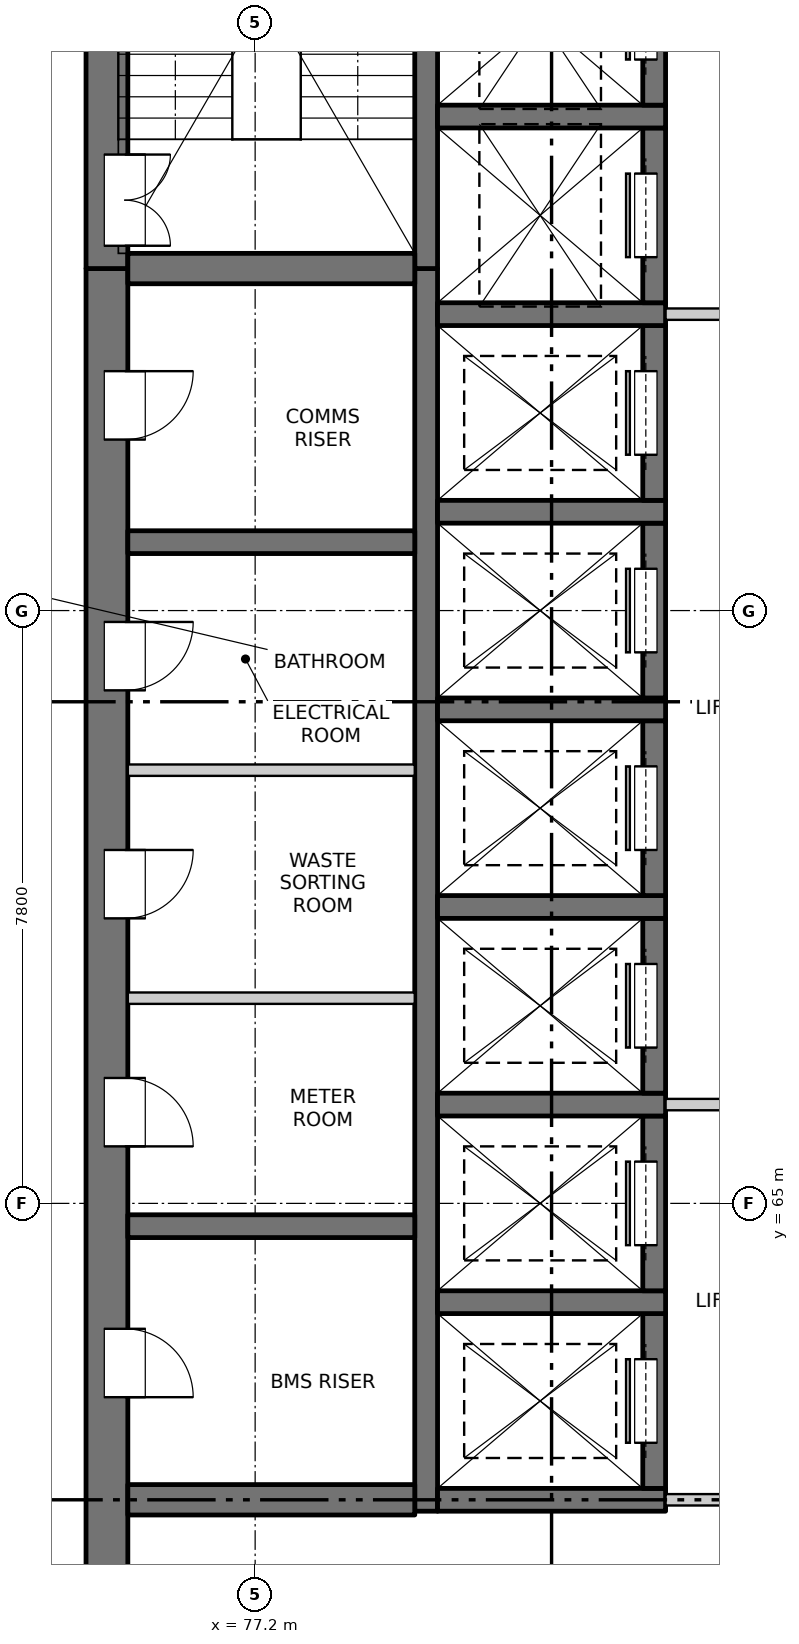
"""IFC4 building model, lengths in metres.
Left out: names, types, materials, properties, quantities, classifications, styles, units other than length and angle.
Written with IfcOpenShell. Run it as: python <this file> out.ifc"""

import sys

from ifc_helpers import new_model, si_unit, direction, frame, frame_2d, origin, place, context, subcontext, project, spatial, rectangle, extrude, element, fill, save


model = new_model("IFC4")
c1 = context("Model", 3, precision=1e-05, world=origin(), true_north=direction((0.0, 1.0)))
c2 = subcontext(c1, "Body", "Model", "MODEL_VIEW")
j1 = project(units=[si_unit("LENGTHUNIT", "METRE"), si_unit("PLANEANGLEUNIT", "RADIAN")], contexts=[c1])
p1 = place(None, origin())
s1 = spatial("IfcSite", under=j1, at=p1, CompositionType="ELEMENT")
p2 = place(p1, origin())
s2 = spatial("IfcBuilding", under=s1, at=p2, CompositionType="ELEMENT")
p3 = place(p2, frame((0.0, 0.0, 123.7)))
s3 = spatial("IfcBuildingStorey", under=s2, at=p3, CompositionType="ELEMENT", Elevation=123.7)
p4 = place(p3, frame((75.25, 54.975, -0.3), z_axis=(0.0, 0.0, 1.0), x_axis=(0.0, 1.0, 0.0)))
e1 = element("IfcWall", 1, at=p4, inside=s3, PredefinedType="SOLIDWALL", context=c2, shape_type="SweptSolid", body=[
    extrude(rectangle(XDim=22.325, YDim=0.55, at=frame_2d((11.163, 0.0))), origin(), (0.0, 0.0, 1.0), 3.45),
])
p5 = place(p4, frame((7.475, 0.0, 0.3)))
e2 = element("IfcOpeningElement", 2, at=p5, cuts=e1, PredefinedType="OPENING", context=c2, shape_type="SweptSolid", body=[
    extrude(rectangle(XDim=0.9, YDim=2.1, at=frame_2d((0.45, 1.05))), frame((0.0, 0.285, 0.0), z_axis=(0.0, -1.0, 0.0), x_axis=(1.0, 0.0, 0.0)), (0.0, 0.0, 1.0), 0.57),
])
p6 = place(p4, frame((10.775, 0.0, 0.3)))
e3 = element("IfcOpeningElement", 3, at=p6, cuts=e1, PredefinedType="OPENING", context=c2, shape_type="SweptSolid", body=[
    extrude(rectangle(XDim=0.9, YDim=2.1, at=frame_2d((0.45, 1.05))), frame((0.0, 0.285, 0.0), z_axis=(0.0, -1.0, 0.0), x_axis=(1.0, 0.0, 0.0)), (0.0, 0.0, 1.0), 0.57),
])
p7 = place(p4, frame((13.775, 0.0, 0.3)))
e4 = element("IfcOpeningElement", 4, at=p7, cuts=e1, PredefinedType="OPENING", context=c2, shape_type="SweptSolid", body=[
    extrude(rectangle(XDim=0.9, YDim=2.1, at=frame_2d((0.45, 1.05))), frame((0.0, 0.285, 0.0), z_axis=(0.0, -1.0, 0.0), x_axis=(1.0, 0.0, 0.0)), (0.0, 0.0, 1.0), 0.57),
])
p8 = place(p4, frame((16.775, 0.0, 0.3)))
e5 = element("IfcOpeningElement", 5, at=p8, cuts=e1, PredefinedType="OPENING", context=c2, shape_type="SweptSolid", body=[
    extrude(rectangle(XDim=0.9, YDim=2.1, at=frame_2d((0.45, 1.05))), frame((0.0, 0.285, 0.0), z_axis=(0.0, -1.0, 0.0), x_axis=(1.0, 0.0, 0.0)), (0.0, 0.0, 1.0), 0.57),
])
p9 = place(p4, frame((20.075, 0.0, 0.3)))
e6 = element("IfcOpeningElement", 6, at=p9, cuts=e1, PredefinedType="OPENING", context=c2, shape_type="SweptSolid", body=[
    extrude(rectangle(XDim=0.9, YDim=2.1, at=frame_2d((0.45, 1.05))), frame((0.0, 0.285, 0.0), z_axis=(0.0, -1.0, 0.0), x_axis=(1.0, 0.0, 0.0)), (0.0, 0.0, 1.0), 0.57),
])
p10 = place(p3, frame((75.25, 77.3, -0.3), z_axis=(0.0, 0.0, 1.0), x_axis=(0.0, 1.0, 0.0)))
e7 = element("IfcWall", 7, at=p10, inside=s3, PredefinedType="SOLIDWALL", context=c2, shape_type="SweptSolid", body=[
    extrude(rectangle(XDim=7.475, YDim=0.55, at=frame_2d((3.737, 0.0))), origin(), (0.0, 0.0, 1.0), 3.45),
])
p11 = place(p10, frame((0.3, 0.0, 0.3)))
e8 = element("IfcOpeningElement", 8, at=p11, cuts=e7, PredefinedType="OPENING", context=c2, shape_type="SweptSolid", body=[
    extrude(rectangle(XDim=1.2, YDim=2.1, at=frame_2d((0.6, 1.05))), frame((0.0, 0.285, 0.0), z_axis=(0.0, -1.0, 0.0), x_axis=(1.0, 0.0, 0.0)), (0.0, 0.0, 1.0), 0.57),
])
p12 = place(p3, frame((79.45, 60.95, -0.3), z_axis=(0.0, 0.0, 1.0), x_axis=(0.0, 1.0, 0.0)))
e9 = element("IfcWall", 9, at=p12, inside=s3, PredefinedType="SOLIDWALL", context=c2, shape_type="SweptSolid", body=[
    extrude(rectangle(XDim=16.35, YDim=0.3, at=frame_2d((8.175, 0.0))), origin(), (0.0, 0.0, 1.0), 3.45),
])
p13 = place(p3, frame((79.45, 77.3, -0.3), z_axis=(0.0, 0.0, 1.0), x_axis=(0.0, 1.0, 0.0)))
e10 = element("IfcWall", 10, at=p13, inside=s3, PredefinedType="SOLIDWALL", context=c2, shape_type="SweptSolid", body=[
    extrude(rectangle(XDim=6.925, YDim=0.3, at=frame_2d((3.462, 0.0))), origin(), (0.0, 0.0, 1.0), 3.45),
])
p14 = place(p3, frame((79.6, 61.1, -0.3), z_axis=(0.0, 0.0, 1.0), x_axis=(1.0, 0.0, 0.0)))
e11 = element("IfcWall", 11, at=p14, inside=s3, PredefinedType="SOLIDWALL", context=c2, shape_type="SweptSolid", body=[
    extrude(rectangle(XDim=3.0, YDim=0.3, at=frame_2d((1.5, 0.0))), origin(), (0.0, 0.0, 1.0), 3.45),
])
p15 = place(p3, frame((82.45, 61.25, -0.3), z_axis=(0.0, 0.0, 1.0), x_axis=(0.0, 1.0, 0.0)))
e12 = element("IfcWall", 12, at=p15, inside=s3, PredefinedType="SOLIDWALL", context=c2, shape_type="SweptSolid", body=[
    extrude(rectangle(XDim=2.3, YDim=0.3, at=frame_2d((1.15, 0.0))), origin(), (0.0, 0.0, 1.0), 3.45),
])
p16 = place(p15, frame((0.6, 0.0, 0.3)))
e13 = element("IfcOpeningElement", 13, at=p16, cuts=e12, PredefinedType="OPENING", context=c2, shape_type="SweptSolid", body=[
    extrude(rectangle(XDim=1.1, YDim=2.1, at=frame_2d((0.55, 1.05))), frame((0.0, 0.16, 0.0), z_axis=(0.0, -1.0, 0.0), x_axis=(1.0, 0.0, 0.0)), (0.0, 0.0, 1.0), 0.32),
])
p17 = place(p3, frame((79.6, 63.7, -0.3), z_axis=(0.0, 0.0, 1.0), x_axis=(1.0, 0.0, 0.0)))
e14 = element("IfcWall", 14, at=p17, inside=s3, PredefinedType="SOLIDWALL", context=c2, shape_type="SweptSolid", body=[
    extrude(rectangle(XDim=3.0, YDim=0.3, at=frame_2d((1.5, 0.0))), origin(), (0.0, 0.0, 1.0), 3.45),
])
p18 = place(p3, frame((82.45, 63.85, -0.3), z_axis=(0.0, 0.0, 1.0), x_axis=(0.0, 1.0, 0.0)))
e15 = element("IfcWall", 15, at=p18, inside=s3, PredefinedType="SOLIDWALL", context=c2, shape_type="SweptSolid", body=[
    extrude(rectangle(XDim=2.3, YDim=0.3, at=frame_2d((1.15, 0.0))), origin(), (0.0, 0.0, 1.0), 3.45),
])
p19 = place(p18, frame((0.6, 0.0, 0.3)))
e16 = element("IfcOpeningElement", 16, at=p19, cuts=e15, PredefinedType="OPENING", context=c2, shape_type="SweptSolid", body=[
    extrude(rectangle(XDim=1.1, YDim=2.1, at=frame_2d((0.55, 1.05))), frame((0.0, 0.16, 0.0), z_axis=(0.0, -1.0, 0.0), x_axis=(1.0, 0.0, 0.0)), (0.0, 0.0, 1.0), 0.32),
])
p20 = place(p3, frame((79.6, 66.3, -0.3), z_axis=(0.0, 0.0, 1.0), x_axis=(1.0, 0.0, 0.0)))
e17 = element("IfcWall", 17, at=p20, inside=s3, PredefinedType="SOLIDWALL", context=c2, shape_type="SweptSolid", body=[
    extrude(rectangle(XDim=3.0, YDim=0.3, at=frame_2d((1.5, 0.0))), origin(), (0.0, 0.0, 1.0), 3.45),
])
p21 = place(p3, frame((82.45, 66.45, -0.3), z_axis=(0.0, 0.0, 1.0), x_axis=(0.0, 1.0, 0.0)))
e18 = element("IfcWall", 18, at=p21, inside=s3, PredefinedType="SOLIDWALL", context=c2, shape_type="SweptSolid", body=[
    extrude(rectangle(XDim=2.3, YDim=0.3, at=frame_2d((1.15, 0.0))), origin(), (0.0, 0.0, 1.0), 3.45),
])
p22 = place(p21, frame((0.6, 0.0, 0.3)))
e19 = element("IfcOpeningElement", 19, at=p22, cuts=e18, PredefinedType="OPENING", context=c2, shape_type="SweptSolid", body=[
    extrude(rectangle(XDim=1.1, YDim=2.1, at=frame_2d((0.55, 1.05))), frame((0.0, 0.16, 0.0), z_axis=(0.0, -1.0, 0.0), x_axis=(1.0, 0.0, 0.0)), (0.0, 0.0, 1.0), 0.32),
])
p23 = place(p3, frame((79.6, 68.9, -0.3), z_axis=(0.0, 0.0, 1.0), x_axis=(1.0, 0.0, 0.0)))
e20 = element("IfcWall", 20, at=p23, inside=s3, PredefinedType="SOLIDWALL", context=c2, shape_type="SweptSolid", body=[
    extrude(rectangle(XDim=3.0, YDim=0.3, at=frame_2d((1.5, 0.0))), origin(), (0.0, 0.0, 1.0), 3.45),
])
p24 = place(p3, frame((82.45, 69.05, -0.3), z_axis=(0.0, 0.0, 1.0), x_axis=(0.0, 1.0, 0.0)))
e21 = element("IfcWall", 21, at=p24, inside=s3, PredefinedType="SOLIDWALL", context=c2, shape_type="SweptSolid", body=[
    extrude(rectangle(XDim=2.3, YDim=0.3, at=frame_2d((1.15, 0.0))), origin(), (0.0, 0.0, 1.0), 3.45),
])
p25 = place(p24, frame((0.6, 0.0, 0.3)))
e22 = element("IfcOpeningElement", 22, at=p25, cuts=e21, PredefinedType="OPENING", context=c2, shape_type="SweptSolid", body=[
    extrude(rectangle(XDim=1.1, YDim=2.1, at=frame_2d((0.55, 1.05))), frame((0.0, 0.16, 0.0), z_axis=(0.0, -1.0, 0.0), x_axis=(1.0, 0.0, 0.0)), (0.0, 0.0, 1.0), 0.32),
])
p26 = place(p3, frame((79.6, 71.5, -0.3), z_axis=(0.0, 0.0, 1.0), x_axis=(1.0, 0.0, 0.0)))
e23 = element("IfcWall", 23, at=p26, inside=s3, PredefinedType="SOLIDWALL", context=c2, shape_type="SweptSolid", body=[
    extrude(rectangle(XDim=3.0, YDim=0.3, at=frame_2d((1.5, 0.0))), origin(), (0.0, 0.0, 1.0), 3.45),
])
p27 = place(p3, frame((82.45, 71.65, -0.3), z_axis=(0.0, 0.0, 1.0), x_axis=(0.0, 1.0, 0.0)))
e24 = element("IfcWall", 24, at=p27, inside=s3, PredefinedType="SOLIDWALL", context=c2, shape_type="SweptSolid", body=[
    extrude(rectangle(XDim=2.3, YDim=0.3, at=frame_2d((1.15, 0.0))), origin(), (0.0, 0.0, 1.0), 3.45),
])
p28 = place(p27, frame((0.6, 0.0, 0.3)))
e25 = element("IfcOpeningElement", 25, at=p28, cuts=e24, PredefinedType="OPENING", context=c2, shape_type="SweptSolid", body=[
    extrude(rectangle(XDim=1.1, YDim=2.1, at=frame_2d((0.55, 1.05))), frame((0.0, 0.16, 0.0), z_axis=(0.0, -1.0, 0.0), x_axis=(1.0, 0.0, 0.0)), (0.0, 0.0, 1.0), 0.32),
])
p29 = place(p3, frame((79.6, 74.1, -0.3), z_axis=(0.0, 0.0, 1.0), x_axis=(1.0, 0.0, 0.0)))
e26 = element("IfcWall", 26, at=p29, inside=s3, PredefinedType="SOLIDWALL", context=c2, shape_type="SweptSolid", body=[
    extrude(rectangle(XDim=3.0, YDim=0.3, at=frame_2d((1.5, 0.0))), origin(), (0.0, 0.0, 1.0), 3.45),
])
p30 = place(p3, frame((82.45, 74.25, -0.3), z_axis=(0.0, 0.0, 1.0), x_axis=(0.0, 1.0, 0.0)))
e27 = element("IfcWall", 27, at=p30, inside=s3, PredefinedType="SOLIDWALL", context=c2, shape_type="SweptSolid", body=[
    extrude(rectangle(XDim=2.3, YDim=0.3, at=frame_2d((1.15, 0.0))), origin(), (0.0, 0.0, 1.0), 3.45),
])
p31 = place(p30, frame((0.6, 0.0, 0.3)))
e28 = element("IfcOpeningElement", 28, at=p31, cuts=e27, PredefinedType="OPENING", context=c2, shape_type="SweptSolid", body=[
    extrude(rectangle(XDim=1.1, YDim=2.1, at=frame_2d((0.55, 1.05))), frame((0.0, 0.16, 0.0), z_axis=(0.0, -1.0, 0.0), x_axis=(1.0, 0.0, 0.0)), (0.0, 0.0, 1.0), 0.32),
])
p32 = place(p3, frame((79.6, 76.7, -0.3), z_axis=(0.0, 0.0, 1.0), x_axis=(1.0, 0.0, 0.0)))
e29 = element("IfcWall", 29, at=p32, inside=s3, PredefinedType="SOLIDWALL", context=c2, shape_type="SweptSolid", body=[
    extrude(rectangle(XDim=3.0, YDim=0.3, at=frame_2d((1.5, 0.0))), origin(), (0.0, 0.0, 1.0), 3.45),
])
p33 = place(p3, frame((82.45, 76.85, -0.3), z_axis=(0.0, 0.0, 1.0), x_axis=(0.0, 1.0, 0.0)))
e30 = element("IfcWall", 30, at=p33, inside=s3, PredefinedType="SOLIDWALL", context=c2, shape_type="SweptSolid", body=[
    extrude(rectangle(XDim=2.3, YDim=0.3, at=frame_2d((1.15, 0.0))), origin(), (0.0, 0.0, 1.0), 3.45),
])
p34 = place(p33, frame((0.6, 0.0, 0.3)))
e31 = element("IfcOpeningElement", 31, at=p34, cuts=e30, PredefinedType="OPENING", context=c2, shape_type="SweptSolid", body=[
    extrude(rectangle(XDim=1.1, YDim=2.1, at=frame_2d((0.55, 1.05))), frame((0.0, 0.16, 0.0), z_axis=(0.0, -1.0, 0.0), x_axis=(1.0, 0.0, 0.0)), (0.0, 0.0, 1.0), 0.32),
])
p35 = place(p3, frame((79.6, 79.3, -0.3), z_axis=(0.0, 0.0, 1.0), x_axis=(1.0, 0.0, 0.0)))
e32 = element("IfcWall", 32, at=p35, inside=s3, PredefinedType="SOLIDWALL", context=c2, shape_type="SweptSolid", body=[
    extrude(rectangle(XDim=3.0, YDim=0.3, at=frame_2d((1.5, 0.0))), origin(), (0.0, 0.0, 1.0), 3.45),
])
p36 = place(p3, frame((82.45, 79.45, -0.3), z_axis=(0.0, 0.0, 1.0), x_axis=(0.0, 1.0, 0.0)))
e33 = element("IfcWall", 33, at=p36, inside=s3, PredefinedType="SOLIDWALL", context=c2, shape_type="SweptSolid", body=[
    extrude(rectangle(XDim=2.3, YDim=0.3, at=frame_2d((1.15, 0.0))), origin(), (0.0, 0.0, 1.0), 3.45),
])
p37 = place(p36, frame((0.6, 0.0, 0.3)))
e34 = element("IfcOpeningElement", 34, at=p37, cuts=e33, PredefinedType="OPENING", context=c2, shape_type="SweptSolid", body=[
    extrude(rectangle(XDim=1.1, YDim=2.1, at=frame_2d((0.55, 1.05))), frame((0.0, 0.16, 0.0), z_axis=(0.0, -1.0, 0.0), x_axis=(1.0, 0.0, 0.0)), (0.0, 0.0, 1.0), 0.32),
])
p38 = place(p3, frame((75.525, 61.1, -0.3), z_axis=(0.0, 0.0, 1.0), x_axis=(1.0, 0.0, 0.0)))
e35 = element("IfcWall", 35, at=p38, inside=s3, PredefinedType="SOLIDWALL", context=c2, shape_type="SweptSolid", body=[
    extrude(rectangle(XDim=3.775, YDim=0.4, at=frame_2d((1.888, 0.0))), origin(), (0.0, 0.0, 1.0), 3.45),
])
for number, where, z_axis, x_axis in (
    (36, (75.525, 64.7, -0.3), (0.0, 0.0, 1.0), (1.0, 0.0, 0.0)),
    (37, (75.525, 73.7, -0.3), (0.0, 0.0, 1.0), (1.0, 0.0, 0.0)),
):
    element("IfcWall", number, at=place(p3, frame(where, z_axis=z_axis, x_axis=x_axis)), inside=s3, PredefinedType="SOLIDWALL", context=c2, shape_type="SweptSolid", body=[
        extrude(rectangle(XDim=3.775, YDim=0.3, at=frame_2d((1.888, 0.0))), origin(), (0.0, 0.0, 1.0), 3.45),
    ])
p39 = place(p3, frame((75.525, 77.3, -0.3), z_axis=(0.0, 0.0, 1.0), x_axis=(1.0, 0.0, 0.0)))
e38 = element("IfcWall", 38, at=p39, inside=s3, PredefinedType="SOLIDWALL", context=c2, shape_type="SweptSolid", body=[
    extrude(rectangle(XDim=3.775, YDim=0.4, at=frame_2d((1.888, 0.0))), origin(), (0.0, 0.0, 1.0), 3.45),
])
p40 = place(p3, frame((82.6, 61.1, 0.0), z_axis=(0.0, 0.0, 1.0), x_axis=(1.0, 0.0, 0.0)))
e39 = element("IfcWall", 39, at=p40, inside=s3, PredefinedType="PARTITIONING", context=c2, shape_type="SweptSolid", body=[
    extrude(rectangle(XDim=4.8, YDim=0.15, at=frame_2d((2.4, 0.0))), origin(), (0.0, 0.0, 1.0), 3.15),
])
p41 = place(p40, frame((1.5, 0.0, 0.0)))
e40 = element("IfcOpeningElement", 40, at=p41, cuts=e39, PredefinedType="OPENING", context=c2, shape_type="SweptSolid", body=[
    extrude(rectangle(XDim=1.8, YDim=2.1, at=frame_2d((0.9, 1.05))), frame((0.0, 0.085, 0.0), z_axis=(0.0, -1.0, 0.0), x_axis=(1.0, 0.0, 0.0)), (0.0, 0.0, 1.0), 0.17),
])
p42 = place(p3, frame((82.6, 66.3, 0.0), z_axis=(0.0, 0.0, 1.0), x_axis=(1.0, 0.0, 0.0)))
e41 = element("IfcWall", 41, at=p42, inside=s3, PredefinedType="PARTITIONING", context=c2, shape_type="SweptSolid", body=[
    extrude(rectangle(XDim=4.8, YDim=0.15, at=frame_2d((2.4, 0.0))), origin(), (0.0, 0.0, 1.0), 3.15),
])
p43 = place(p42, frame((1.5, 0.0, 0.0)))
e42 = element("IfcOpeningElement", 42, at=p43, cuts=e41, PredefinedType="OPENING", context=c2, shape_type="SweptSolid", body=[
    extrude(rectangle(XDim=1.8, YDim=2.1, at=frame_2d((0.9, 1.05))), frame((0.0, 0.085, 0.0), z_axis=(0.0, -1.0, 0.0), x_axis=(1.0, 0.0, 0.0)), (0.0, 0.0, 1.0), 0.17),
])
for number, where, z_axis, x_axis in (
    (43, (75.525, 67.7, 0.0), (0.0, 0.0, 1.0), (1.0, 0.0, 0.0)),
    (44, (75.525, 70.7, 0.0), (0.0, 0.0, 1.0), (1.0, 0.0, 0.0)),
):
    element("IfcWall", number, at=place(p3, frame(where, z_axis=z_axis, x_axis=x_axis)), inside=s3, PredefinedType="PARTITIONING", context=c2, shape_type="SweptSolid", body=[
        extrude(rectangle(XDim=3.775, YDim=0.15, at=frame_2d((1.887, 0.0))), origin(), (0.0, 0.0, 1.0), 3.15),
    ])
p44 = place(p3, frame((82.6, 76.7, 0.0), z_axis=(0.0, 0.0, 1.0), x_axis=(1.0, 0.0, 0.0)))
e45 = element("IfcWall", 45, at=p44, inside=s3, PredefinedType="PARTITIONING", context=c2, shape_type="SweptSolid", body=[
    extrude(rectangle(XDim=4.8, YDim=0.15, at=frame_2d((2.4, 0.0))), origin(), (0.0, 0.0, 1.0), 3.15),
])
p45 = place(p44, frame((1.5, 0.0, 0.0)))
e46 = element("IfcOpeningElement", 46, at=p45, cuts=e45, PredefinedType="OPENING", context=c2, shape_type="SweptSolid", body=[
    extrude(rectangle(XDim=1.8, YDim=2.1, at=frame_2d((0.9, 1.05))), frame((0.0, 0.085, 0.0), z_axis=(0.0, -1.0, 0.0), x_axis=(1.0, 0.0, 0.0)), (0.0, 0.0, 1.0), 0.17),
])
p46 = place(p16, origin())
e47 = element("IfcDoor", 47, at=p46, inside=s3, OperationType="SLIDING_TO_RIGHT", PredefinedType="DOOR", context=c2, shape_type="SweptSolid", body=[
    extrude(rectangle(XDim=1.1, YDim=2.1, at=frame_2d((0.55, 1.05))), frame((0.0, 0.135, 0.0), z_axis=(0.0, -1.0, 0.0), x_axis=(1.0, 0.0, 0.0)), (0.0, 0.0, 1.0), 0.05),
])
fill(e13, e47)
p47 = place(p5, origin())
e48 = element("IfcDoor", 48, at=p47, inside=s3, OperationType="SINGLE_SWING_RIGHT", PredefinedType="DOOR", context=c2, shape_type="SweptSolid", body=[
    extrude(rectangle(XDim=0.9, YDim=2.1, at=frame_2d((0.45, 1.05))), frame((0.0, -0.21, 0.0), z_axis=(0.0, -1.0, 0.0), x_axis=(1.0, 0.0, 0.0)), (0.0, 0.0, 1.0), 0.05),
])
fill(e2, e48)
p48 = place(p19, origin())
e49 = element("IfcDoor", 49, at=p48, inside=s3, OperationType="SLIDING_TO_RIGHT", PredefinedType="DOOR", context=c2, shape_type="SweptSolid", body=[
    extrude(rectangle(XDim=1.1, YDim=2.1, at=frame_2d((0.55, 1.05))), frame((0.0, 0.135, 0.0), z_axis=(0.0, -1.0, 0.0), x_axis=(1.0, 0.0, 0.0)), (0.0, 0.0, 1.0), 0.05),
])
fill(e16, e49)
p49 = place(p6, origin())
e50 = element("IfcDoor", 50, at=p49, inside=s3, OperationType="SINGLE_SWING_RIGHT", PredefinedType="DOOR", context=c2, shape_type="SweptSolid", body=[
    extrude(rectangle(XDim=0.9, YDim=2.1, at=frame_2d((0.45, 1.05))), frame((0.0, -0.21, 0.0), z_axis=(0.0, -1.0, 0.0), x_axis=(1.0, 0.0, 0.0)), (0.0, 0.0, 1.0), 0.05),
])
fill(e3, e50)
p50 = place(p22, origin())
e51 = element("IfcDoor", 51, at=p50, inside=s3, OperationType="SLIDING_TO_RIGHT", PredefinedType="DOOR", context=c2, shape_type="SweptSolid", body=[
    extrude(rectangle(XDim=1.1, YDim=2.1, at=frame_2d((0.55, 1.05))), frame((0.0, 0.135, 0.0), z_axis=(0.0, -1.0, 0.0), x_axis=(1.0, 0.0, 0.0)), (0.0, 0.0, 1.0), 0.05),
])
fill(e19, e51)
p51 = place(p7, origin())
e52 = element("IfcDoor", 52, at=p51, inside=s3, OperationType="SINGLE_SWING_LEFT", PredefinedType="DOOR", context=c2, shape_type="SweptSolid", body=[
    extrude(rectangle(XDim=0.9, YDim=2.1, at=frame_2d((0.45, 1.05))), frame((0.0, -0.21, 0.0), z_axis=(0.0, -1.0, 0.0), x_axis=(1.0, 0.0, 0.0)), (0.0, 0.0, 1.0), 0.05),
])
fill(e4, e52)
p52 = place(p25, origin())
e53 = element("IfcDoor", 53, at=p52, inside=s3, OperationType="SLIDING_TO_LEFT", PredefinedType="DOOR", context=c2, shape_type="SweptSolid", body=[
    extrude(rectangle(XDim=1.1, YDim=2.1, at=frame_2d((0.55, 1.05))), frame((0.0, 0.135, 0.0), z_axis=(0.0, -1.0, 0.0), x_axis=(1.0, 0.0, 0.0)), (0.0, 0.0, 1.0), 0.05),
])
fill(e22, e53)
p53 = place(p8, origin())
e54 = element("IfcDoor", 54, at=p53, inside=s3, OperationType="SINGLE_SWING_LEFT", PredefinedType="DOOR", context=c2, shape_type="SweptSolid", body=[
    extrude(rectangle(XDim=0.9, YDim=2.1, at=frame_2d((0.45, 1.05))), frame((0.0, -0.21, 0.0), z_axis=(0.0, -1.0, 0.0), x_axis=(1.0, 0.0, 0.0)), (0.0, 0.0, 1.0), 0.05),
])
fill(e5, e54)
p54 = place(p28, origin())
e55 = element("IfcDoor", 55, at=p54, inside=s3, OperationType="SLIDING_TO_LEFT", PredefinedType="DOOR", context=c2, shape_type="SweptSolid", body=[
    extrude(rectangle(XDim=1.1, YDim=2.1, at=frame_2d((0.55, 1.05))), frame((0.0, 0.135, 0.0), z_axis=(0.0, -1.0, 0.0), x_axis=(1.0, 0.0, 0.0)), (0.0, 0.0, 1.0), 0.05),
])
fill(e25, e55)
p55 = place(p31, origin())
e56 = element("IfcDoor", 56, at=p55, inside=s3, OperationType="SLIDING_TO_LEFT", PredefinedType="DOOR", context=c2, shape_type="SweptSolid", body=[
    extrude(rectangle(XDim=1.1, YDim=2.1, at=frame_2d((0.55, 1.05))), frame((0.0, 0.135, 0.0), z_axis=(0.0, -1.0, 0.0), x_axis=(1.0, 0.0, 0.0)), (0.0, 0.0, 1.0), 0.05),
])
fill(e28, e56)
p56 = place(p9, origin())
e57 = element("IfcDoor", 57, at=p56, inside=s3, OperationType="SINGLE_SWING_LEFT", PredefinedType="DOOR", context=c2, shape_type="SweptSolid", body=[
    extrude(rectangle(XDim=0.9, YDim=2.1, at=frame_2d((0.45, 1.05))), frame((0.0, -0.21, 0.0), z_axis=(0.0, -1.0, 0.0), x_axis=(1.0, 0.0, 0.0)), (0.0, 0.0, 1.0), 0.05),
])
fill(e6, e57)
p57 = place(p34, origin())
e58 = element("IfcDoor", 58, at=p57, inside=s3, OperationType="SLIDING_TO_LEFT", PredefinedType="DOOR", context=c2, shape_type="SweptSolid", body=[
    extrude(rectangle(XDim=1.1, YDim=2.1, at=frame_2d((0.55, 1.05))), frame((0.0, 0.135, 0.0), z_axis=(0.0, -1.0, 0.0), x_axis=(1.0, 0.0, 0.0)), (0.0, 0.0, 1.0), 0.05),
])
fill(e31, e58)
p58 = place(p11, origin())
e59 = element("IfcDoor", 59, at=p58, inside=s3, OperationType="DOUBLE_DOOR_SINGLE_SWING", PredefinedType="DOOR", context=c2, shape_type="SweptSolid", body=[
    extrude(rectangle(XDim=1.2, YDim=2.1, at=frame_2d((0.6, 1.05))), frame((0.0, -0.21, 0.0), z_axis=(0.0, -1.0, 0.0), x_axis=(1.0, 0.0, 0.0)), (0.0, 0.0, 1.0), 0.05),
])
fill(e8, e59)
p59 = place(p37, origin())
e60 = element("IfcDoor", 60, at=p59, inside=s3, OperationType="SLIDING_TO_LEFT", PredefinedType="DOOR", context=c2, shape_type="SweptSolid", body=[
    extrude(rectangle(XDim=1.1, YDim=2.1, at=frame_2d((0.55, 1.05))), frame((0.0, 0.135, 0.0), z_axis=(0.0, -1.0, 0.0), x_axis=(1.0, 0.0, 0.0)), (0.0, 0.0, 1.0), 0.05),
])
fill(e34, e60)
save(model, sys.argv[1])
